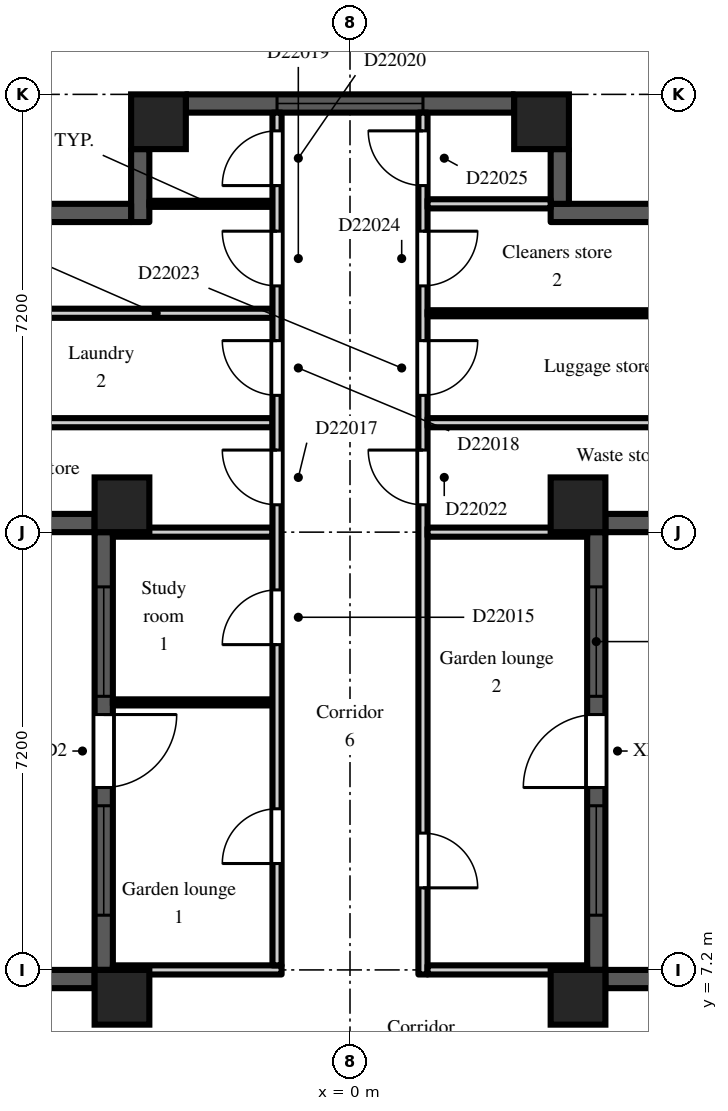
"""IFC4 building model, lengths in metres.
Left out: names, types, materials, properties, quantities, classifications, styles, units other than length and angle.
Written with IfcOpenShell. Run it as: python <this file> out.ifc"""

import sys

from ifc_helpers import new_model, si_unit, direction, frame, frame_2d, origin, origin_2d, place, context, subcontext, project, spatial, rectangle, extrude, element, fill, save


model = new_model("IFC4")
c1 = context("Model", 3, precision=1e-05, world=origin(), true_north=direction((0.0, 1.0)))
c2 = subcontext(c1, "Body", "Model", "MODEL_VIEW")
j1 = project(units=[si_unit("LENGTHUNIT", "METRE"), si_unit("PLANEANGLEUNIT", "RADIAN")], contexts=[c1])
p1 = place(None, origin())
s1 = spatial("IfcSite", under=j1, at=p1, CompositionType="ELEMENT")
p2 = place(p1, origin())
s2 = spatial("IfcBuilding", under=s1, at=p2, CompositionType="ELEMENT")
p3 = place(p2, frame((0.0, 0.0, 156.3)))
s3 = spatial("IfcBuildingStorey", under=s2, at=p3, CompositionType="ELEMENT", Elevation=156.3)
for number, where, z_axis, x_axis in (
    (1, (-3.75, 6.75, 0.0), (0.0, 0.0, 1.0), (1.0, 0.0, 0.0)),
    (2, (-3.75, 14.85, 0.0), (0.0, 0.0, 1.0), (1.0, 0.0, 0.0)),
    (3, (-3.15, 21.15, 0.0), (0.0, 0.0, 1.0), (1.0, 0.0, 0.0)),
    (4, (3.15, 21.15, 0.0), (0.0, 0.0, 1.0), (1.0, 0.0, 0.0)),
    (5, (3.75, 6.75, 0.0), (0.0, 0.0, 1.0), (1.0, 0.0, 0.0)),
    (6, (3.75, 14.85, 0.0), (0.0, 0.0, 1.0), (1.0, 0.0, 0.0)),
):
    element("IfcColumn", number, at=place(p3, frame(where, z_axis=z_axis, x_axis=x_axis)), inside=s3, PredefinedType="COLUMN", context=c2, shape_type="SweptSolid", body=[
        extrude(rectangle(XDim=0.9, YDim=0.9, at=origin_2d()), origin(), (0.0, 0.0, 1.0), 3.0),
    ])
p4 = place(p3, frame((7.2, 7.05, 0.0), z_axis=(0.0, 0.0, 1.0), x_axis=(-1.0, 0.0, 0.0)))
e7 = element("IfcWall", 7, at=p4, inside=s3, PredefinedType="SOLIDWALL", context=c2, shape_type="SweptSolid", body=[
    extrude(rectangle(XDim=3.0, YDim=0.3, at=frame_2d((1.5, 0.0))), origin(), (0.0, 0.0, 1.0), 2.2),
])
p5 = place(p3, frame((4.05, 7.2, 0.0), z_axis=(0.0, 0.0, 1.0), x_axis=(0.0, 1.0, 0.0)))
e8 = element("IfcWall", 8, at=p5, inside=s3, PredefinedType="SOLIDWALL", context=c2, shape_type="SweptSolid", body=[
    extrude(rectangle(XDim=7.2, YDim=0.3, at=frame_2d((3.6, 0.0))), origin(), (0.0, 0.0, 1.0), 2.2),
])
p6 = place(p5, frame((3.0, 0.0, 0.0)))
e9 = element("IfcOpeningElement", 9, at=p6, cuts=e8, PredefinedType="OPENING", context=c2, shape_type="SweptSolid", body=[
    extrude(rectangle(XDim=1.2, YDim=2.05, at=frame_2d((0.6, 1.025))), frame((0.0, 0.16, 0.0), z_axis=(0.0, -1.0, 0.0), x_axis=(1.0, 0.0, 0.0)), (0.0, 0.0, 1.0), 0.32),
])
p7 = place(p5, frame((0.9, 0.0, 0.2)))
e10 = element("IfcOpeningElement", 10, at=p7, cuts=e8, PredefinedType="OPENING", context=c2, shape_type="SweptSolid", body=[
    extrude(rectangle(XDim=1.8, YDim=1.85, at=frame_2d((0.9, 0.925))), frame((0.0, 0.16, 0.0), z_axis=(0.0, -1.0, 0.0), x_axis=(1.0, 0.0, 0.0)), (0.0, 0.0, 1.0), 0.32),
])
p8 = place(p5, frame((4.5, 0.0, 0.2)))
e11 = element("IfcOpeningElement", 11, at=p8, cuts=e8, PredefinedType="OPENING", context=c2, shape_type="SweptSolid", body=[
    extrude(rectangle(XDim=1.8, YDim=1.85, at=frame_2d((0.9, 0.925))), frame((0.0, 0.16, 0.0), z_axis=(0.0, -1.0, 0.0), x_axis=(1.0, 0.0, 0.0)), (0.0, 0.0, 1.0), 0.32),
])
p9 = place(p3, frame((4.2, 14.55, 0.0), z_axis=(0.0, 0.0, 1.0), x_axis=(1.0, 0.0, 0.0)))
e12 = element("IfcWall", 12, at=p9, inside=s3, PredefinedType="SOLIDWALL", context=c2, shape_type="SweptSolid", body=[
    extrude(rectangle(XDim=2.1, YDim=0.3, at=frame_2d((1.05, 0.0))), origin(), (0.0, 0.0, 1.0), 2.2),
])
p10 = place(p3, frame((5.1, 19.65, 0.0), z_axis=(0.0, 0.0, 1.0), x_axis=(-1.0, 0.0, 0.0)))
e13 = element("IfcWall", 13, at=p10, inside=s3, PredefinedType="SOLIDWALL", context=c2, shape_type="SweptSolid", body=[
    extrude(rectangle(XDim=1.8, YDim=0.3, at=frame_2d((0.9, 0.0))), origin(), (0.0, 0.0, 1.0), 2.6),
])
p11 = place(p3, frame((3.45, 19.8, 0.0), z_axis=(0.0, 0.0, 1.0), x_axis=(0.0, 1.0, 0.0)))
e14 = element("IfcWall", 14, at=p11, inside=s3, PredefinedType="SOLIDWALL", context=c2, shape_type="SweptSolid", body=[
    extrude(rectangle(XDim=0.9, YDim=0.3, at=frame_2d((0.45, 0.0))), origin(), (0.0, 0.0, 1.0), 2.6),
])
p12 = place(p3, frame((2.7, 21.45, 0.0), z_axis=(0.0, 0.0, 1.0), x_axis=(-1.0, 0.0, 0.0)))
e15 = element("IfcWall", 15, at=p12, inside=s3, PredefinedType="SOLIDWALL", context=c2, shape_type="SweptSolid", body=[
    extrude(rectangle(XDim=5.4, YDim=0.3, at=frame_2d((2.7, 0.0))), origin(), (0.0, 0.0, 1.0), 2.2),
])
p13 = place(p12, frame((1.5, 0.0, 0.2)))
e16 = element("IfcOpeningElement", 16, at=p13, cuts=e15, PredefinedType="OPENING", context=c2, shape_type="SweptSolid", body=[
    extrude(rectangle(XDim=2.4, YDim=1.85, at=frame_2d((1.2, 0.925))), frame((0.0, 0.16, 0.0), z_axis=(0.0, -1.0, 0.0), x_axis=(1.0, 0.0, 0.0)), (0.0, 0.0, 1.0), 0.32),
])
p14 = place(p3, frame((-3.45, 20.7, 0.0), z_axis=(0.0, 0.0, 1.0), x_axis=(0.0, -1.0, 0.0)))
e17 = element("IfcWall", 17, at=p14, inside=s3, PredefinedType="SOLIDWALL", context=c2, shape_type="SweptSolid", body=[
    extrude(rectangle(XDim=1.2, YDim=0.3, at=frame_2d((0.6, 0.0))), origin(), (0.0, 0.0, 1.0), 2.6),
])
p15 = place(p3, frame((-3.6, 19.65, 0.0), z_axis=(0.0, 0.0, 1.0), x_axis=(-1.0, 0.0, 0.0)))
e18 = element("IfcWall", 18, at=p15, inside=s3, PredefinedType="SOLIDWALL", context=c2, shape_type="SweptSolid", body=[
    extrude(rectangle(XDim=1.8, YDim=0.3, at=frame_2d((0.9, 0.0))), origin(), (0.0, 0.0, 1.0), 2.6),
])
p16 = place(p3, frame((-6.3, 14.55, 0.0), z_axis=(0.0, 0.0, 1.0), x_axis=(1.0, 0.0, 0.0)))
e19 = element("IfcWall", 19, at=p16, inside=s3, PredefinedType="SOLIDWALL", context=c2, shape_type="SweptSolid", body=[
    extrude(rectangle(XDim=2.1, YDim=0.3, at=frame_2d((1.05, 0.0))), origin(), (0.0, 0.0, 1.0), 2.2),
])
p17 = place(p3, frame((-4.05, 14.4, 0.0), z_axis=(0.0, 0.0, 1.0), x_axis=(0.0, -1.0, 0.0)))
e20 = element("IfcWall", 20, at=p17, inside=s3, PredefinedType="SOLIDWALL", context=c2, shape_type="SweptSolid", body=[
    extrude(rectangle(XDim=7.2, YDim=0.3, at=frame_2d((3.6, 0.0))), origin(), (0.0, 0.0, 1.0), 2.2),
])
p18 = place(p17, frame((3.0, 0.0, 0.0)))
e21 = element("IfcOpeningElement", 21, at=p18, cuts=e20, PredefinedType="OPENING", context=c2, shape_type="SweptSolid", body=[
    extrude(rectangle(XDim=1.2, YDim=2.05, at=frame_2d((0.6, 1.025))), frame((0.0, 0.16, 0.0), z_axis=(0.0, -1.0, 0.0), x_axis=(1.0, 0.0, 0.0)), (0.0, 0.0, 1.0), 0.32),
])
p19 = place(p17, frame((0.9, 0.0, 0.2)))
e22 = element("IfcOpeningElement", 22, at=p19, cuts=e20, PredefinedType="OPENING", context=c2, shape_type="SweptSolid", body=[
    extrude(rectangle(XDim=1.8, YDim=1.85, at=frame_2d((0.9, 0.925))), frame((0.0, 0.16, 0.0), z_axis=(0.0, -1.0, 0.0), x_axis=(1.0, 0.0, 0.0)), (0.0, 0.0, 1.0), 0.32),
])
p20 = place(p17, frame((4.5, 0.0, 0.2)))
e23 = element("IfcOpeningElement", 23, at=p20, cuts=e20, PredefinedType="OPENING", context=c2, shape_type="SweptSolid", body=[
    extrude(rectangle(XDim=1.8, YDim=1.85, at=frame_2d((0.9, 0.925))), frame((0.0, 0.16, 0.0), z_axis=(0.0, -1.0, 0.0), x_axis=(1.0, 0.0, 0.0)), (0.0, 0.0, 1.0), 0.32),
])
p21 = place(p3, frame((-4.2, 7.05, 0.0), z_axis=(0.0, 0.0, 1.0), x_axis=(-1.0, 0.0, 0.0)))
e24 = element("IfcWall", 24, at=p21, inside=s3, PredefinedType="SOLIDWALL", context=c2, shape_type="SweptSolid", body=[
    extrude(rectangle(XDim=3.0, YDim=0.3, at=frame_2d((1.5, 0.0))), origin(), (0.0, 0.0, 1.0), 2.2),
])
p22 = place(p3, frame((-6.9, 16.2, 0.0), z_axis=(0.0, 0.0, 1.0), x_axis=(1.0, 0.0, 0.0)))
e25 = element("IfcWall", 25, at=p22, inside=s3, PredefinedType="PARTITIONING", context=c2, shape_type="SweptSolid", body=[
    extrude(rectangle(XDim=5.625, YDim=0.15, at=frame_2d((2.812, 0.0))), origin(), (0.0, 0.0, 1.0), 2.6),
])
p23 = place(p3, frame((-5.1, 18.0, 0.0), z_axis=(0.0, 0.0, 1.0), x_axis=(1.0, 0.0, 0.0)))
e26 = element("IfcWall", 26, at=p23, inside=s3, PredefinedType="PARTITIONING", context=c2, shape_type="SweptSolid", body=[
    extrude(rectangle(XDim=3.825, YDim=0.15, at=frame_2d((1.913, 0.0))), origin(), (0.0, 0.0, 1.0), 2.6),
])
p24 = place(p3, frame((-3.9, 7.2, 0.0), z_axis=(0.0, 0.0, 1.0), x_axis=(1.0, 0.0, 0.0)))
e27 = element("IfcWall", 27, at=p24, inside=s3, PredefinedType="PARTITIONING", context=c2, shape_type="SweptSolid", body=[
    extrude(rectangle(XDim=2.775, YDim=0.15, at=frame_2d((1.387, 0.0))), origin(), (0.0, 0.0, 1.0), 2.6),
])
p25 = place(p3, frame((-3.9, 11.6, 0.0), z_axis=(0.0, 0.0, 1.0), x_axis=(1.0, 0.0, 0.0)))
e28 = element("IfcWall", 28, at=p25, inside=s3, PredefinedType="PARTITIONING", context=c2, shape_type="SweptSolid", body=[
    extrude(rectangle(XDim=2.625, YDim=0.1, at=frame_2d((1.312, 0.0))), origin(), (0.0, 0.0, 1.0), 2.6),
])
p26 = place(p3, frame((-3.9, 14.4, 0.0), z_axis=(0.0, 0.0, 1.0), x_axis=(1.0, 0.0, 0.0)))
e29 = element("IfcWall", 29, at=p26, inside=s3, PredefinedType="PARTITIONING", context=c2, shape_type="SweptSolid", body=[
    extrude(rectangle(XDim=2.625, YDim=0.15, at=frame_2d((1.312, 0.0))), origin(), (0.0, 0.0, 1.0), 2.6),
])
p27 = place(p3, frame((-3.3, 19.8, 0.0), z_axis=(0.0, 0.0, 1.0), x_axis=(1.0, 0.0, 0.0)))
e30 = element("IfcWall", 30, at=p27, inside=s3, PredefinedType="PARTITIONING", context=c2, shape_type="SweptSolid", body=[
    extrude(rectangle(XDim=2.025, YDim=0.1, at=frame_2d((1.013, 0.0))), origin(), (0.0, 0.0, 1.0), 2.6),
])
p28 = place(p3, frame((-1.2, 7.275, 0.0), z_axis=(0.0, 0.0, 1.0), x_axis=(0.0, 1.0, 0.0)))
e31 = element("IfcWall", 31, at=p28, inside=s3, PredefinedType="PARTITIONING", context=c2, shape_type="SweptSolid", body=[
    extrude(rectangle(XDim=14.025, YDim=0.15, at=frame_2d((7.013, 0.0))), origin(), (0.0, 0.0, 1.0), 2.6),
])
p29 = place(p28, frame((5.275, 0.0, 0.0)))
e32 = element("IfcOpeningElement", 32, at=p29, cuts=e31, PredefinedType="OPENING", context=c2, shape_type="SweptSolid", body=[
    extrude(rectangle(XDim=0.9, YDim=2.1, at=frame_2d((0.45, 1.05))), frame((0.0, 0.085, 0.0), z_axis=(0.0, -1.0, 0.0), x_axis=(1.0, 0.0, 0.0)), (0.0, 0.0, 1.0), 0.17),
])
p30 = place(p28, frame((1.675, 0.0, 0.0)))
e33 = element("IfcOpeningElement", 33, at=p30, cuts=e31, PredefinedType="OPENING", context=c2, shape_type="SweptSolid", body=[
    extrude(rectangle(XDim=0.9, YDim=2.1, at=frame_2d((0.45, 1.05))), frame((0.0, 0.085, 0.0), z_axis=(0.0, -1.0, 0.0), x_axis=(1.0, 0.0, 0.0)), (0.0, 0.0, 1.0), 0.17),
])
p31 = place(p28, frame((7.575, 0.0, 0.0)))
e34 = element("IfcOpeningElement", 34, at=p31, cuts=e31, PredefinedType="OPENING", context=c2, shape_type="SweptSolid", body=[
    extrude(rectangle(XDim=0.9, YDim=2.1, at=frame_2d((0.45, 1.05))), frame((0.0, 0.085, 0.0), z_axis=(0.0, -1.0, 0.0), x_axis=(1.0, 0.0, 0.0)), (0.0, 0.0, 1.0), 0.17),
])
p32 = place(p28, frame((9.375, 0.0, 0.0)))
e35 = element("IfcOpeningElement", 35, at=p32, cuts=e31, PredefinedType="OPENING", context=c2, shape_type="SweptSolid", body=[
    extrude(rectangle(XDim=0.9, YDim=2.1, at=frame_2d((0.45, 1.05))), frame((0.0, 0.085, 0.0), z_axis=(0.0, -1.0, 0.0), x_axis=(1.0, 0.0, 0.0)), (0.0, 0.0, 1.0), 0.17),
])
p33 = place(p28, frame((11.175, 0.0, 0.0)))
e36 = element("IfcOpeningElement", 36, at=p33, cuts=e31, PredefinedType="OPENING", context=c2, shape_type="SweptSolid", body=[
    extrude(rectangle(XDim=0.9, YDim=2.1, at=frame_2d((0.45, 1.05))), frame((0.0, 0.085, 0.0), z_axis=(0.0, -1.0, 0.0), x_axis=(1.0, 0.0, 0.0)), (0.0, 0.0, 1.0), 0.17),
])
p34 = place(p28, frame((12.825, 0.0, 0.0)))
e37 = element("IfcOpeningElement", 37, at=p34, cuts=e31, PredefinedType="OPENING", context=c2, shape_type="SweptSolid", body=[
    extrude(rectangle(XDim=0.9, YDim=2.1, at=frame_2d((0.45, 1.05))), frame((0.0, 0.085, 0.0), z_axis=(0.0, -1.0, 0.0), x_axis=(1.0, 0.0, 0.0)), (0.0, 0.0, 1.0), 0.17),
])
p35 = place(p3, frame((1.2, 7.125, 0.0), z_axis=(0.0, 0.0, 1.0), x_axis=(0.0, 1.0, 0.0)))
e38 = element("IfcWall", 38, at=p35, inside=s3, PredefinedType="PARTITIONING", context=c2, shape_type="SweptSolid", body=[
    extrude(rectangle(XDim=14.175, YDim=0.15, at=frame_2d((7.087, 0.0))), origin(), (0.0, 0.0, 1.0), 2.6),
])
p36 = place(p35, frame((1.425, 0.0, 0.0)))
e39 = element("IfcOpeningElement", 39, at=p36, cuts=e38, PredefinedType="OPENING", context=c2, shape_type="SweptSolid", body=[
    extrude(rectangle(XDim=0.9, YDim=2.1, at=frame_2d((0.45, 1.05))), frame((0.0, 0.085, 0.0), z_axis=(0.0, -1.0, 0.0), x_axis=(1.0, 0.0, 0.0)), (0.0, 0.0, 1.0), 0.17),
])
p37 = place(p35, frame((7.725, 0.0, 0.0)))
e40 = element("IfcOpeningElement", 40, at=p37, cuts=e38, PredefinedType="OPENING", context=c2, shape_type="SweptSolid", body=[
    extrude(rectangle(XDim=0.9, YDim=2.1, at=frame_2d((0.45, 1.05))), frame((0.0, 0.085, 0.0), z_axis=(0.0, -1.0, 0.0), x_axis=(1.0, 0.0, 0.0)), (0.0, 0.0, 1.0), 0.17),
])
p38 = place(p35, frame((9.525, 0.0, 0.0)))
e41 = element("IfcOpeningElement", 41, at=p38, cuts=e38, PredefinedType="OPENING", context=c2, shape_type="SweptSolid", body=[
    extrude(rectangle(XDim=0.9, YDim=2.1, at=frame_2d((0.45, 1.05))), frame((0.0, 0.085, 0.0), z_axis=(0.0, -1.0, 0.0), x_axis=(1.0, 0.0, 0.0)), (0.0, 0.0, 1.0), 0.17),
])
p39 = place(p35, frame((11.325, 0.0, 0.0)))
e42 = element("IfcOpeningElement", 42, at=p39, cuts=e38, PredefinedType="OPENING", context=c2, shape_type="SweptSolid", body=[
    extrude(rectangle(XDim=0.9, YDim=2.1, at=frame_2d((0.45, 1.05))), frame((0.0, 0.085, 0.0), z_axis=(0.0, -1.0, 0.0), x_axis=(1.0, 0.0, 0.0)), (0.0, 0.0, 1.0), 0.17),
])
p40 = place(p35, frame((12.975, 0.0, 0.0)))
e43 = element("IfcOpeningElement", 43, at=p40, cuts=e38, PredefinedType="OPENING", context=c2, shape_type="SweptSolid", body=[
    extrude(rectangle(XDim=0.9, YDim=2.1, at=frame_2d((0.45, 1.05))), frame((0.0, 0.085, 0.0), z_axis=(0.0, -1.0, 0.0), x_axis=(1.0, 0.0, 0.0)), (0.0, 0.0, 1.0), 0.17),
])
for number, where, z_axis, x_axis in (
    (44, (1.275, 7.2, 0.0), (0.0, 0.0, 1.0), (1.0, 0.0, 0.0)),
    (45, (1.275, 14.4, 0.0), (0.0, 0.0, 1.0), (1.0, 0.0, 0.0)),
):
    element("IfcWall", number, at=place(p3, frame(where, z_axis=z_axis, x_axis=x_axis)), inside=s3, PredefinedType="PARTITIONING", context=c2, shape_type="SweptSolid", body=[
        extrude(rectangle(XDim=2.625, YDim=0.15, at=frame_2d((1.312, 0.0))), origin(), (0.0, 0.0, 1.0), 2.6),
    ])
p41 = place(p3, frame((1.275, 16.2, 0.0), z_axis=(0.0, 0.0, 1.0), x_axis=(1.0, 0.0, 0.0)))
e46 = element("IfcWall", 46, at=p41, inside=s3, PredefinedType="PARTITIONING", context=c2, shape_type="SweptSolid", body=[
    extrude(rectangle(XDim=5.625, YDim=0.15, at=frame_2d((2.812, 0.0))), origin(), (0.0, 0.0, 1.0), 2.6),
])
p42 = place(p3, frame((1.275, 18.0, 0.0), z_axis=(0.0, 0.0, 1.0), x_axis=(1.0, 0.0, 0.0)))
e47 = element("IfcWall", 47, at=p42, inside=s3, PredefinedType="PARTITIONING", context=c2, shape_type="SweptSolid", body=[
    extrude(rectangle(XDim=3.825, YDim=0.1, at=frame_2d((1.913, 0.0))), origin(), (0.0, 0.0, 1.0), 2.6),
])
p43 = place(p3, frame((1.275, 19.8, 0.0), z_axis=(0.0, 0.0, 1.0), x_axis=(1.0, 0.0, 0.0)))
e48 = element("IfcWall", 48, at=p43, inside=s3, PredefinedType="PARTITIONING", context=c2, shape_type="SweptSolid", body=[
    extrude(rectangle(XDim=2.025, YDim=0.15, at=frame_2d((1.013, 0.0))), origin(), (0.0, 0.0, 1.0), 2.6),
])
p44 = place(p6, origin())
e49 = element("IfcDoor", 49, at=p44, inside=s3, OperationType="SINGLE_SWING_LEFT", PredefinedType="DOOR", context=c2, shape_type="SweptSolid", body=[
    extrude(rectangle(XDim=1.2, YDim=2.05, at=frame_2d((0.6, 1.025))), frame((0.0, 0.025, 0.0), z_axis=(0.0, -1.0, 0.0), x_axis=(1.0, 0.0, 0.0)), (0.0, 0.0, 1.0), 0.05),
])
fill(e9, e49)
p45 = place(p7, origin())
e50 = element("IfcWindow", 50, at=p45, inside=s3, PartitioningType="SINGLE_PANEL", PredefinedType="WINDOW", context=c2, shape_type="SweptSolid", body=[
    extrude(rectangle(XDim=1.8, YDim=1.85, at=frame_2d((0.9, 0.925))), frame((0.0, 0.03, 0.0), z_axis=(0.0, -1.0, 0.0), x_axis=(1.0, 0.0, 0.0)), (0.0, 0.0, 1.0), 0.06),
])
fill(e10, e50)
p46 = place(p8, origin())
e51 = element("IfcWindow", 51, at=p46, inside=s3, PartitioningType="SINGLE_PANEL", PredefinedType="WINDOW", context=c2, shape_type="SweptSolid", body=[
    extrude(rectangle(XDim=1.8, YDim=1.85, at=frame_2d((0.9, 0.925))), frame((0.0, 0.03, 0.0), z_axis=(0.0, -1.0, 0.0), x_axis=(1.0, 0.0, 0.0)), (0.0, 0.0, 1.0), 0.06),
])
fill(e11, e51)
p47 = place(p13, origin())
e52 = element("IfcWindow", 52, at=p47, inside=s3, PartitioningType="SINGLE_PANEL", PredefinedType="WINDOW", context=c2, shape_type="SweptSolid", body=[
    extrude(rectangle(XDim=2.4, YDim=1.85, at=frame_2d((1.2, 0.925))), frame((0.0, 0.03, 0.0), z_axis=(0.0, -1.0, 0.0), x_axis=(1.0, 0.0, 0.0)), (0.0, 0.0, 1.0), 0.06),
])
fill(e16, e52)
p48 = place(p18, origin())
e53 = element("IfcDoor", 53, at=p48, inside=s3, OperationType="SINGLE_SWING_LEFT", PredefinedType="DOOR", context=c2, shape_type="SweptSolid", body=[
    extrude(rectangle(XDim=1.2, YDim=2.05, at=frame_2d((0.6, 1.025))), frame((0.0, 0.025, 0.0), z_axis=(0.0, -1.0, 0.0), x_axis=(1.0, 0.0, 0.0)), (0.0, 0.0, 1.0), 0.05),
])
fill(e21, e53)
p49 = place(p19, origin())
e54 = element("IfcWindow", 54, at=p49, inside=s3, PartitioningType="SINGLE_PANEL", PredefinedType="WINDOW", context=c2, shape_type="SweptSolid", body=[
    extrude(rectangle(XDim=1.8, YDim=1.85, at=frame_2d((0.9, 0.925))), frame((0.0, 0.03, 0.0), z_axis=(0.0, -1.0, 0.0), x_axis=(1.0, 0.0, 0.0)), (0.0, 0.0, 1.0), 0.06),
])
fill(e22, e54)
p50 = place(p20, origin())
e55 = element("IfcWindow", 55, at=p50, inside=s3, PartitioningType="SINGLE_PANEL", PredefinedType="WINDOW", context=c2, shape_type="SweptSolid", body=[
    extrude(rectangle(XDim=1.8, YDim=1.85, at=frame_2d((0.9, 0.925))), frame((0.0, 0.03, 0.0), z_axis=(0.0, -1.0, 0.0), x_axis=(1.0, 0.0, 0.0)), (0.0, 0.0, 1.0), 0.06),
])
fill(e23, e55)
p51 = place(p29, origin())
e56 = element("IfcDoor", 56, at=p51, inside=s3, OperationType="SINGLE_SWING_LEFT", PredefinedType="DOOR", context=c2, shape_type="SweptSolid", body=[
    extrude(rectangle(XDim=0.9, YDim=2.1, at=frame_2d((0.45, 1.05))), frame((0.0, 0.025, 0.0), z_axis=(0.0, -1.0, 0.0), x_axis=(1.0, 0.0, 0.0)), (0.0, 0.0, 1.0), 0.05),
])
fill(e32, e56)
p52 = place(p30, origin())
e57 = element("IfcDoor", 57, at=p52, inside=s3, OperationType="SINGLE_SWING_LEFT", PredefinedType="DOOR", context=c2, shape_type="SweptSolid", body=[
    extrude(rectangle(XDim=0.9, YDim=2.1, at=frame_2d((0.45, 1.05))), frame((0.0, 0.025, 0.0), z_axis=(0.0, -1.0, 0.0), x_axis=(1.0, 0.0, 0.0)), (0.0, 0.0, 1.0), 0.05),
])
fill(e33, e57)
p53 = place(p31, origin())
e58 = element("IfcDoor", 58, at=p53, inside=s3, OperationType="SINGLE_SWING_RIGHT", PredefinedType="DOOR", context=c2, shape_type="SweptSolid", body=[
    extrude(rectangle(XDim=0.9, YDim=2.1, at=frame_2d((0.45, 1.05))), frame((0.0, 0.025, 0.0), z_axis=(0.0, -1.0, 0.0), x_axis=(1.0, 0.0, 0.0)), (0.0, 0.0, 1.0), 0.05),
])
fill(e34, e58)
p54 = place(p32, origin())
e59 = element("IfcDoor", 59, at=p54, inside=s3, OperationType="SINGLE_SWING_RIGHT", PredefinedType="DOOR", context=c2, shape_type="SweptSolid", body=[
    extrude(rectangle(XDim=0.9, YDim=2.1, at=frame_2d((0.45, 1.05))), frame((0.0, 0.025, 0.0), z_axis=(0.0, -1.0, 0.0), x_axis=(1.0, 0.0, 0.0)), (0.0, 0.0, 1.0), 0.05),
])
fill(e35, e59)
p55 = place(p33, origin())
e60 = element("IfcDoor", 60, at=p55, inside=s3, OperationType="SINGLE_SWING_RIGHT", PredefinedType="DOOR", context=c2, shape_type="SweptSolid", body=[
    extrude(rectangle(XDim=0.9, YDim=2.1, at=frame_2d((0.45, 1.05))), frame((0.0, 0.025, 0.0), z_axis=(0.0, -1.0, 0.0), x_axis=(1.0, 0.0, 0.0)), (0.0, 0.0, 1.0), 0.05),
])
fill(e36, e60)
p56 = place(p34, origin())
e61 = element("IfcDoor", 61, at=p56, inside=s3, OperationType="SINGLE_SWING_LEFT", PredefinedType="DOOR", context=c2, shape_type="SweptSolid", body=[
    extrude(rectangle(XDim=0.9, YDim=2.1, at=frame_2d((0.45, 1.05))), frame((0.0, 0.025, 0.0), z_axis=(0.0, -1.0, 0.0), x_axis=(1.0, 0.0, 0.0)), (0.0, 0.0, 1.0), 0.05),
])
fill(e37, e61)
p57 = place(p36, frame((0.9, 0.0, 0.0), z_axis=(0.0, 0.0, 1.0), x_axis=(-1.0, 0.0, 0.0)))
e62 = element("IfcDoor", 62, at=p57, inside=s3, OperationType="SINGLE_SWING_RIGHT", PredefinedType="DOOR", context=c2, shape_type="SweptSolid", body=[
    extrude(rectangle(XDim=0.9, YDim=2.1, at=frame_2d((0.45, 1.05))), frame((0.0, 0.025, 0.0), z_axis=(0.0, -1.0, 0.0), x_axis=(1.0, 0.0, 0.0)), (0.0, 0.0, 1.0), 0.05),
])
fill(e39, e62)
p58 = place(p37, origin())
e63 = element("IfcDoor", 63, at=p58, inside=s3, OperationType="SINGLE_SWING_RIGHT", PredefinedType="DOOR", context=c2, shape_type="SweptSolid", body=[
    extrude(rectangle(XDim=0.9, YDim=2.1, at=frame_2d((0.45, 1.05))), frame((0.0, 0.025, 0.0), z_axis=(0.0, -1.0, 0.0), x_axis=(1.0, 0.0, 0.0)), (0.0, 0.0, 1.0), 0.05),
])
fill(e40, e63)
p59 = place(p38, frame((0.9, 0.0, 0.0), z_axis=(0.0, 0.0, 1.0), x_axis=(-1.0, 0.0, 0.0)))
e64 = element("IfcDoor", 64, at=p59, inside=s3, OperationType="SINGLE_SWING_LEFT", PredefinedType="DOOR", context=c2, shape_type="SweptSolid", body=[
    extrude(rectangle(XDim=0.9, YDim=2.1, at=frame_2d((0.45, 1.05))), frame((0.0, 0.025, 0.0), z_axis=(0.0, -1.0, 0.0), x_axis=(1.0, 0.0, 0.0)), (0.0, 0.0, 1.0), 0.05),
])
fill(e41, e64)
p60 = place(p39, frame((0.9, 0.0, 0.0), z_axis=(0.0, 0.0, 1.0), x_axis=(-1.0, 0.0, 0.0)))
e65 = element("IfcDoor", 65, at=p60, inside=s3, OperationType="SINGLE_SWING_LEFT", PredefinedType="DOOR", context=c2, shape_type="SweptSolid", body=[
    extrude(rectangle(XDim=0.9, YDim=2.1, at=frame_2d((0.45, 1.05))), frame((0.0, 0.025, 0.0), z_axis=(0.0, -1.0, 0.0), x_axis=(1.0, 0.0, 0.0)), (0.0, 0.0, 1.0), 0.05),
])
fill(e42, e65)
p61 = place(p40, origin())
e66 = element("IfcDoor", 66, at=p61, inside=s3, OperationType="SINGLE_SWING_RIGHT", PredefinedType="DOOR", context=c2, shape_type="SweptSolid", body=[
    extrude(rectangle(XDim=0.9, YDim=2.1, at=frame_2d((0.45, 1.05))), frame((0.0, 0.025, 0.0), z_axis=(0.0, -1.0, 0.0), x_axis=(1.0, 0.0, 0.0)), (0.0, 0.0, 1.0), 0.05),
])
fill(e43, e66)
save(model, sys.argv[1])
